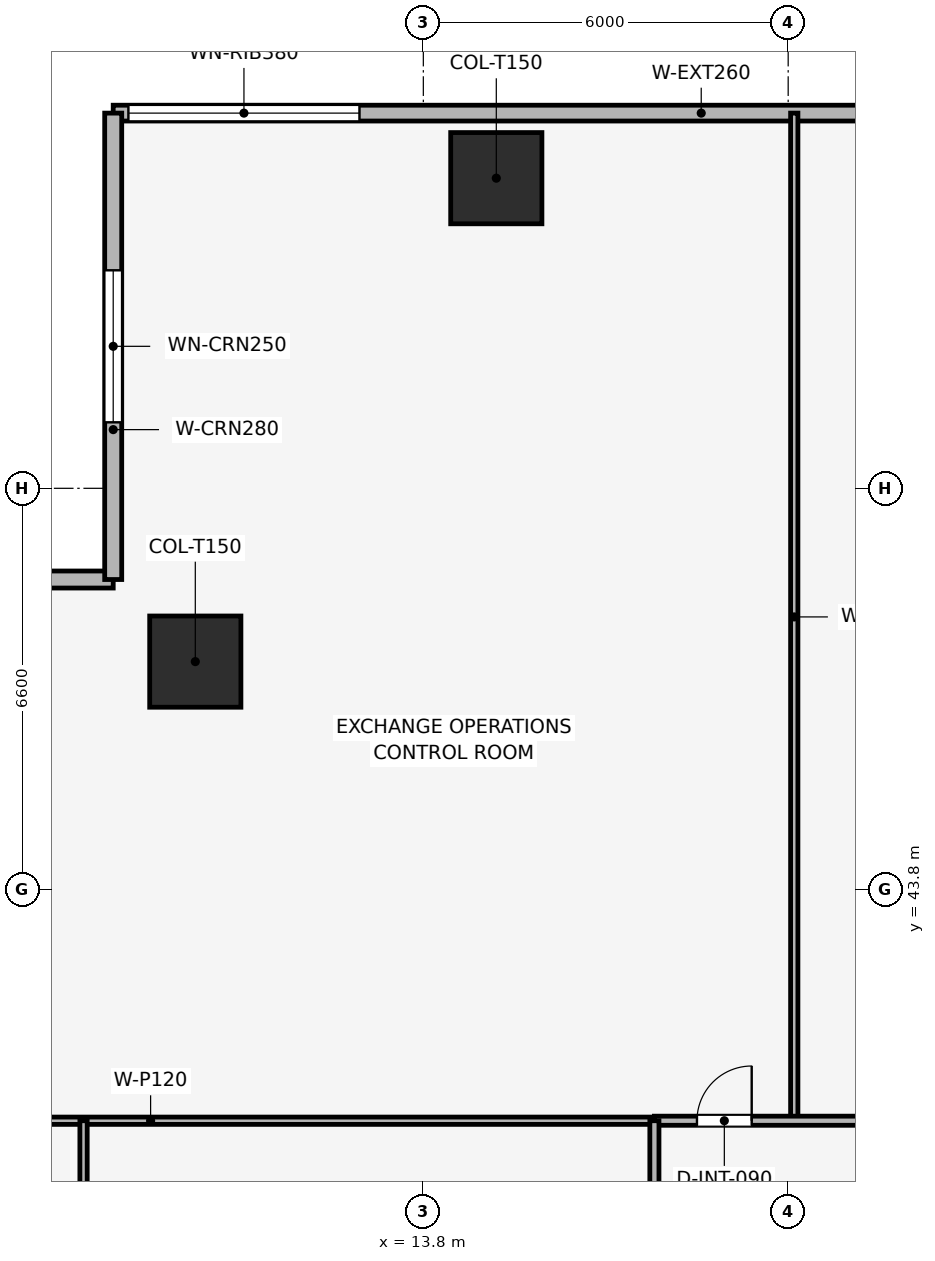
"""IFC4 building model, lengths in metres.
Left out: names, types, materials, properties, quantities, classifications, styles, units other than length and angle.
Written with IfcOpenShell. Run it as: python <this file> out.ifc"""

import sys

from ifc_helpers import new_model, si_unit, direction, frame, frame_2d, origin, origin_2d, place, context, subcontext, project, spatial, rectangle, extrude, element, fill, save


model = new_model("IFC4")
c1 = context("Model", 3, precision=1e-05, world=origin(), true_north=direction((0.0, 1.0)))
c2 = subcontext(c1, "Body", "Model", "MODEL_VIEW")
j1 = project(units=[si_unit("LENGTHUNIT", "METRE"), si_unit("PLANEANGLEUNIT", "RADIAN")], contexts=[c1])
p1 = place(None, origin())
s1 = spatial("IfcSite", under=j1, at=p1, CompositionType="ELEMENT")
p2 = place(p1, origin())
s2 = spatial("IfcBuilding", under=s1, at=p2, CompositionType="ELEMENT")
p3 = place(p2, frame((0.0, 0.0, 53.4)))
s3 = spatial("IfcBuildingStorey", under=s2, at=p3, CompositionType="ELEMENT", Elevation=53.4)
for number, where, z_axis, x_axis in (
    (1, (15.0, 55.5, 0.003), (0.0, 0.0, 1.0), (1.0, 0.0, 0.0)),
    (2, (10.05, 47.55, 0.003), (0.0, 0.0, 1.0), (1.0, 0.0, 0.0)),
):
    element("IfcColumn", number, at=place(p3, frame(where, z_axis=z_axis, x_axis=x_axis)), inside=s3, PredefinedType="COLUMN", context=c2, shape_type="SweptSolid", body=[
        extrude(rectangle(XDim=1.5, YDim=1.5, at=origin_2d()), origin(), (0.0, 0.0, 1.0), 3.644),
    ])
p4 = place(p3, frame((8.7, 56.57, 0.0), z_axis=(0.0, 0.0, 1.0), x_axis=(1.0, 0.0, 0.0)))
e3 = element("IfcWall", 3, at=p4, inside=s3, PredefinedType="SOLIDWALL", context=c2, shape_type="SweptSolid", body=[
    extrude(rectangle(XDim=15.3, YDim=0.26, at=frame_2d((7.65, 0.0))), origin(), (0.0, 0.0, 1.0), 3.65),
])
p5 = place(p4, frame((0.25, 0.0, 0.9)))
e4 = element("IfcOpeningElement", 4, at=p5, cuts=e3, PredefinedType="OPENING", context=c2, shape_type="SweptSolid", body=[
    extrude(rectangle(XDim=3.8, YDim=1.9, at=frame_2d((1.9, 0.95))), frame((0.0, 0.14, 0.0), z_axis=(0.0, -1.0, 0.0), x_axis=(1.0, 0.0, 0.0)), (0.0, 0.0, 1.0), 0.28),
])
p6 = place(p3, frame((1.03, 48.9, 0.0), z_axis=(0.0, 0.0, 1.0), x_axis=(1.0, 0.0, 0.0)))
e5 = element("IfcWall", 5, at=p6, inside=s3, PredefinedType="SOLIDWALL", context=c2, shape_type="SweptSolid", body=[
    extrude(rectangle(XDim=7.67, YDim=0.28, at=frame_2d((3.835, 0.0))), origin(), (0.0, 0.0, 1.0), 3.65),
])
p7 = place(p6, frame((2.585, 0.0, 0.9)))
e6 = element("IfcOpeningElement", 6, at=p7, cuts=e5, PredefinedType="OPENING", context=c2, shape_type="SweptSolid", body=[
    extrude(rectangle(XDim=2.5, YDim=1.9, at=frame_2d((1.25, 0.95))), frame((0.0, 0.15, 0.0), z_axis=(0.0, -1.0, 0.0), x_axis=(1.0, 0.0, 0.0)), (0.0, 0.0, 1.0), 0.3),
])
p8 = place(p3, frame((8.7, 48.9, 0.0), z_axis=(0.0, 0.0, 1.0), x_axis=(0.0, 1.0, 0.0)))
e7 = element("IfcWall", 7, at=p8, inside=s3, PredefinedType="SOLIDWALL", context=c2, shape_type="SweptSolid", body=[
    extrude(rectangle(XDim=7.67, YDim=0.28, at=frame_2d((3.835, 0.0))), origin(), (0.0, 0.0, 1.0), 3.65),
])
p9 = place(p8, frame((2.585, 0.0, 0.9)))
e8 = element("IfcOpeningElement", 8, at=p9, cuts=e7, PredefinedType="OPENING", context=c2, shape_type="SweptSolid", body=[
    extrude(rectangle(XDim=2.5, YDim=1.9, at=frame_2d((1.25, 0.95))), frame((0.0, 0.15, 0.0), z_axis=(0.0, -1.0, 0.0), x_axis=(1.0, 0.0, 0.0)), (0.0, 0.0, 1.0), 0.3),
])
for number, where, z_axis, x_axis in (
    (9, (19.9, 40.0, 0.0), (0.0, 0.0, 1.0), (0.0, 1.0, 0.0)),
    (10, (1.03, 40.0, 0.0), (0.0, 0.0, 1.0), (1.0, 0.0, 0.0)),
):
    element("IfcWall", number, at=place(p3, frame(where, z_axis=z_axis, x_axis=x_axis)), inside=s3, PredefinedType="PARTITIONING", context=c2, shape_type="SweptSolid", body=[
        extrude(rectangle(XDim=16.57, YDim=0.12, at=frame_2d((8.285, 0.0))), origin(), (0.0, 0.0, 1.0), 2.935),
    ])
p10 = place(p3, frame((8.212, 31.962, 0.0), z_axis=(0.0, 0.0, 1.0), x_axis=(0.0, 1.0, 0.0)))
e11 = element("IfcWall", 11, at=p10, inside=s3, PredefinedType="PARTITIONING", context=c2, shape_type="SweptSolid", body=[
    extrude(rectangle(XDim=8.038, YDim=0.12, at=frame_2d((4.019, 0.0))), origin(), (0.0, 0.0, 1.0), 3.085),
])
p11 = place(p10, frame((3.288, 0.0, 0.0)))
e12 = element("IfcOpeningElement", 12, at=p11, cuts=e11, PredefinedType="OPENING", context=c2, shape_type="SweptSolid", body=[
    extrude(rectangle(XDim=0.9, YDim=2.1, at=frame_2d((0.45, 1.05))), frame((0.0, 0.07, 0.0), z_axis=(0.0, -1.0, 0.0), x_axis=(1.0, 0.0, 0.0)), (0.0, 0.0, 1.0), 0.14),
])
p12 = place(p3, frame((17.6, 40.0, 0.0), z_axis=(0.0, 0.0, 1.0), x_axis=(1.0, 0.0, 0.0)))
e13 = element("IfcWall", 13, at=p12, inside=s3, PredefinedType="PARTITIONING", context=c2, shape_type="SweptSolid", body=[
    extrude(rectangle(XDim=22.4, YDim=0.15, at=frame_2d((11.2, 0.0))), origin(), (0.0, 0.0, 1.0), 3.085),
])
p13 = place(p12, frame((0.7, 0.0, 0.0)))
e14 = element("IfcOpeningElement", 14, at=p13, cuts=e13, PredefinedType="OPENING", context=c2, shape_type="SweptSolid", body=[
    extrude(rectangle(XDim=0.9, YDim=2.1, at=frame_2d((0.45, 1.05))), frame((0.0, 0.085, 0.0), z_axis=(0.0, -1.0, 0.0), x_axis=(1.0, 0.0, 0.0)), (0.0, 0.0, 1.0), 0.17),
])
p14 = place(p12, frame((6.378, 0.0, 0.0)))
e15 = element("IfcOpeningElement", 15, at=p14, cuts=e13, PredefinedType="OPENING", context=c2, shape_type="SweptSolid", body=[
    extrude(rectangle(XDim=0.9, YDim=2.1, at=frame_2d((0.45, 1.05))), frame((0.0, 0.085, 0.0), z_axis=(0.0, -1.0, 0.0), x_axis=(1.0, 0.0, 0.0)), (0.0, 0.0, 1.0), 0.17),
])
p15 = place(p12, frame((16.428, 0.0, 0.0)))
e16 = element("IfcOpeningElement", 16, at=p15, cuts=e13, PredefinedType="OPENING", context=c2, shape_type="SweptSolid", body=[
    extrude(rectangle(XDim=0.9, YDim=2.1, at=frame_2d((0.45, 1.05))), frame((0.0, 0.085, 0.0), z_axis=(0.0, -1.0, 0.0), x_axis=(1.0, 0.0, 0.0)), (0.0, 0.0, 1.0), 0.17),
])
p16 = place(p3, frame((17.6, 17.6, 0.0), z_axis=(0.0, 0.0, 1.0), x_axis=(0.0, 1.0, 0.0)))
e17 = element("IfcWall", 17, at=p16, inside=s3, PredefinedType="PARTITIONING", context=c2, shape_type="SweptSolid", body=[
    extrude(rectangle(XDim=22.4, YDim=0.15, at=frame_2d((11.2, 0.0))), origin(), (0.0, 0.0, 1.0), 3.085),
])
p17 = place(p16, frame((0.707, 0.0, 0.0)))
e18 = element("IfcOpeningElement", 18, at=p17, cuts=e17, PredefinedType="OPENING", context=c2, shape_type="SweptSolid", body=[
    extrude(rectangle(XDim=0.9, YDim=2.1, at=frame_2d((0.45, 1.05))), frame((0.0, 0.085, 0.0), z_axis=(0.0, -1.0, 0.0), x_axis=(1.0, 0.0, 0.0)), (0.0, 0.0, 1.0), 0.17),
])
p18 = place(p16, frame((4.745, 0.0, 0.0)))
e19 = element("IfcOpeningElement", 19, at=p18, cuts=e17, PredefinedType="OPENING", context=c2, shape_type="SweptSolid", body=[
    extrude(rectangle(XDim=0.9, YDim=2.1, at=frame_2d((0.45, 1.05))), frame((0.0, 0.085, 0.0), z_axis=(0.0, -1.0, 0.0), x_axis=(1.0, 0.0, 0.0)), (0.0, 0.0, 1.0), 0.17),
])
p19 = place(p16, frame((10.769, 0.0, 0.0)))
e20 = element("IfcOpeningElement", 20, at=p19, cuts=e17, PredefinedType="OPENING", context=c2, shape_type="SweptSolid", body=[
    extrude(rectangle(XDim=0.9, YDim=2.1, at=frame_2d((0.45, 1.05))), frame((0.0, 0.085, 0.0), z_axis=(0.0, -1.0, 0.0), x_axis=(1.0, 0.0, 0.0)), (0.0, 0.0, 1.0), 0.17),
])
p20 = place(p16, frame((17.931, 0.0, 0.0)))
e21 = element("IfcOpeningElement", 21, at=p20, cuts=e17, PredefinedType="OPENING", context=c2, shape_type="SweptSolid", body=[
    extrude(rectangle(XDim=0.9, YDim=2.1, at=frame_2d((0.45, 1.05))), frame((0.0, 0.085, 0.0), z_axis=(0.0, -1.0, 0.0), x_axis=(1.0, 0.0, 0.0)), (0.0, 0.0, 1.0), 0.17),
])
p21 = place(p5, origin())
e22 = element("IfcWindow", 22, at=p21, inside=s3, PartitioningType="SINGLE_PANEL", PredefinedType="WINDOW", context=c2, shape_type="SweptSolid", body=[
    extrude(rectangle(XDim=3.8, YDim=1.9, at=frame_2d((1.9, 0.95))), frame((0.0, 0.03, 0.0), z_axis=(0.0, -1.0, 0.0), x_axis=(1.0, 0.0, 0.0)), (0.0, 0.0, 1.0), 0.06),
])
fill(e4, e22)
p22 = place(p9, origin())
e23 = element("IfcWindow", 23, at=p22, inside=s3, PartitioningType="SINGLE_PANEL", PredefinedType="WINDOW", context=c2, shape_type="SweptSolid", body=[
    extrude(rectangle(XDim=2.5, YDim=1.9, at=frame_2d((1.25, 0.95))), frame((0.0, 0.03, 0.0), z_axis=(0.0, -1.0, 0.0), x_axis=(1.0, 0.0, 0.0)), (0.0, 0.0, 1.0), 0.06),
])
fill(e8, e23)
p23 = place(p13, origin())
e24 = element("IfcDoor", 24, at=p23, inside=s3, OperationType="SINGLE_SWING_RIGHT", PredefinedType="DOOR", context=c2, shape_type="SweptSolid", body=[
    extrude(rectangle(XDim=0.9, YDim=2.1, at=frame_2d((0.45, 1.05))), frame((0.0, 0.025, 0.0), z_axis=(0.0, -1.0, 0.0), x_axis=(1.0, 0.0, 0.0)), (0.0, 0.0, 1.0), 0.05),
])
fill(e14, e24)
save(model, sys.argv[1])
